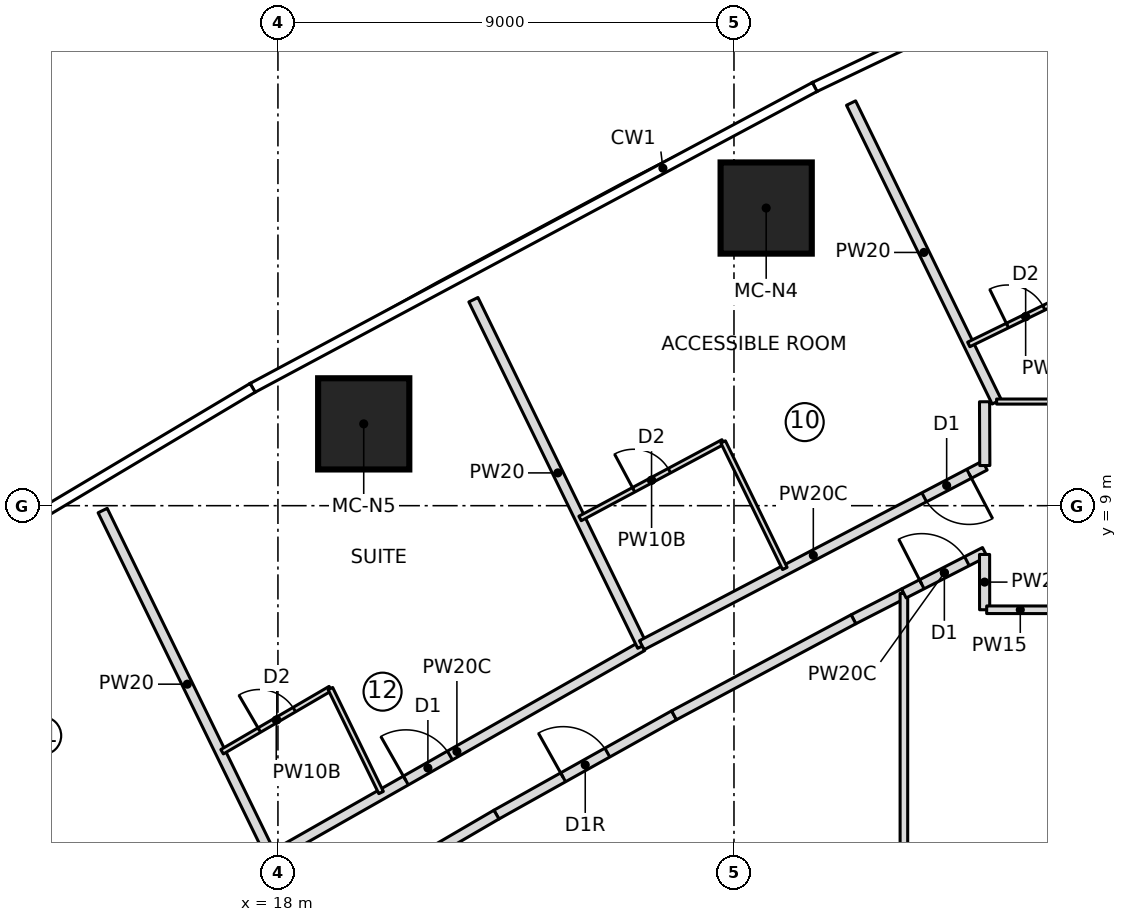
"""IFC4 building model, lengths in metres.
Left out: names, types, materials, properties, quantities, classifications, styles, units other than length and angle.
Written with IfcOpenShell. Run it as: python <this file> out.ifc"""

import sys

from ifc_helpers import new_model, si_unit, direction, frame, frame_2d, origin, origin_2d, place, context, subcontext, project, spatial, rectangle, extrude, element, fill, save


model = new_model("IFC4")
c1 = context("Model", 3, precision=1e-05, world=origin(), true_north=direction((0.0, 1.0)))
c2 = subcontext(c1, "Body", "Model", "MODEL_VIEW")
j1 = project(units=[si_unit("LENGTHUNIT", "METRE"), si_unit("PLANEANGLEUNIT", "RADIAN")], contexts=[c1])
p1 = place(None, origin())
s1 = spatial("IfcSite", under=j1, at=p1, CompositionType="ELEMENT")
p2 = place(p1, origin())
s2 = spatial("IfcBuilding", under=s1, at=p2, CompositionType="ELEMENT")
p3 = place(p2, frame((0.0, 0.0, 50.25)))
s3 = spatial("IfcBuildingStorey", under=s2, at=p3, CompositionType="ELEMENT", Elevation=50.25)
for number, where, z_axis, x_axis in (
    (1, (27.635, 14.874, 0.0), (0.0, 0.0, 1.0), (1.0, 0.0, 0.0)),
    (2, (19.693, 10.615, 0.0), (0.0, 0.0, 1.0), (1.0, 0.0, 0.0)),
):
    element("IfcColumn", number, at=place(p3, frame(where, z_axis=z_axis, x_axis=x_axis)), inside=s3, PredefinedType="COLUMN", context=c2, shape_type="SweptSolid", body=[
        extrude(rectangle(XDim=1.8, YDim=1.8, at=origin_2d()), origin(), (0.0, 0.0, 1.0), 3.55),
    ])
p4 = place(p3, frame((17.882, 2.05, 0.0), z_axis=(0.0, 0.0, 1.0), x_axis=(-0.438213564788, 0.898870887078, 0.0)))
e3 = element("IfcWall", 3, at=p4, inside=s3, PredefinedType="PARTITIONING", context=c2, shape_type="SweptSolid", body=[
    extrude(rectangle(XDim=7.625, YDim=0.2, at=frame_2d((3.813, 0.0))), origin(), (0.0, 0.0, 1.0), 3.25),
])
p5 = place(p3, frame((17.874, 2.068, 0.0), z_axis=(0.0, 0.0, 1.0), x_axis=(0.869280098963, 0.494319845391, 0.0)))
e4 = element("IfcWall", 4, at=p5, inside=s3, PredefinedType="PARTITIONING", context=c2, shape_type="SweptSolid", body=[
    extrude(rectangle(XDim=8.417, YDim=0.2, at=frame_2d((4.208, 0.0))), origin(), (0.0, 0.0, 1.0), 3.25),
])
p6 = place(p5, frame((3.05, 0.0, 0.0)))
e5 = element("IfcOpeningElement", 5, at=p6, cuts=e4, PredefinedType="OPENING", context=c2, shape_type="SweptSolid", body=[
    extrude(rectangle(XDim=1.0, YDim=2.1, at=frame_2d((0.5, 1.05))), frame((0.0, 0.11, 0.0), z_axis=(0.0, -1.0, 0.0), x_axis=(1.0, 0.0, 0.0)), (0.0, 0.0, 1.0), 0.22),
])
p7 = place(p3, frame((16.898, 4.144, 0.0), z_axis=(0.0, 0.0, 1.0), x_axis=(0.863707305865, 0.503993739837, 0.0)))
e6 = element("IfcWall", 6, at=p7, inside=s3, PredefinedType="PARTITIONING", context=c2, shape_type="SweptSolid", body=[
    extrude(rectangle(XDim=2.474, YDim=0.1, at=frame_2d((1.237, 0.0))), origin(), (0.0, 0.0, 1.0), 3.25),
])
p8 = place(p7, frame((0.85, 0.0, 0.0)))
e7 = element("IfcOpeningElement", 7, at=p8, cuts=e6, PredefinedType="OPENING", context=c2, shape_type="SweptSolid", body=[
    extrude(rectangle(XDim=0.8, YDim=2.1, at=frame_2d((0.4, 1.05))), frame((0.0, 0.06, 0.0), z_axis=(0.0, -1.0, 0.0), x_axis=(1.0, 0.0, 0.0)), (0.0, 0.0, 1.0), 0.12),
])
p9 = place(p3, frame((19.035, 5.39, 0.0), z_axis=(0.0, 0.0, 1.0), x_axis=(0.438122322582, -0.898915363344, 0.0)))
e8 = element("IfcWall", 8, at=p9, inside=s3, PredefinedType="PARTITIONING", context=c2, shape_type="SweptSolid", body=[
    extrude(rectangle(XDim=2.283, YDim=0.1, at=frame_2d((1.142, 0.0))), origin(), (0.0, 0.0, 1.0), 3.25),
])
p10 = place(p3, frame((25.19, 6.229, 0.0), z_axis=(0.0, 0.0, 1.0), x_axis=(-0.438202895602, 0.898876088394, 0.0)))
e9 = element("IfcWall", 9, at=p10, inside=s3, PredefinedType="PARTITIONING", context=c2, shape_type="SweptSolid", body=[
    extrude(rectangle(XDim=7.605, YDim=0.2, at=frame_2d((3.803, 0.0))), origin(), (0.0, 0.0, 1.0), 3.25),
])
p11 = place(p3, frame((31.95, 9.792, 0.0), z_axis=(0.0, 0.0, 1.0), x_axis=(-0.88581965272, -0.464029678851, 0.0)))
e10 = element("IfcWall", 10, at=p11, inside=s3, PredefinedType="PARTITIONING", context=c2, shape_type="SweptSolid", body=[
    extrude(rectangle(XDim=7.641, YDim=0.2, at=frame_2d((3.821, 0.0))), origin(), (0.0, 0.0, 1.0), 3.25),
])
p12 = place(p11, frame((0.35, 0.0, 0.0)))
e11 = element("IfcOpeningElement", 11, at=p12, cuts=e10, PredefinedType="OPENING", context=c2, shape_type="SweptSolid", body=[
    extrude(rectangle(XDim=1.0, YDim=2.1, at=frame_2d((0.5, 1.05))), frame((0.0, 0.11, 0.0), z_axis=(0.0, -1.0, 0.0), x_axis=(1.0, 0.0, 0.0)), (0.0, 0.0, 1.0), 0.22),
])
p13 = place(p3, frame((23.962, 8.748, 0.0), z_axis=(0.0, 0.0, 1.0), x_axis=(0.881653338438, 0.471897648672, 0.0)))
e12 = element("IfcWall", 12, at=p13, inside=s3, PredefinedType="PARTITIONING", context=c2, shape_type="SweptSolid", body=[
    extrude(rectangle(XDim=3.202, YDim=0.1, at=frame_2d((1.601, 0.0))), origin(), (0.0, 0.0, 1.0), 3.25),
])
p14 = place(p13, frame((1.2, 0.0, 0.0)))
e13 = element("IfcOpeningElement", 13, at=p14, cuts=e12, PredefinedType="OPENING", context=c2, shape_type="SweptSolid", body=[
    extrude(rectangle(XDim=0.8, YDim=2.1, at=frame_2d((0.4, 1.05))), frame((0.0, 0.06, 0.0), z_axis=(0.0, -1.0, 0.0), x_axis=(1.0, 0.0, 0.0)), (0.0, 0.0, 1.0), 0.12),
])
p15 = place(p3, frame((26.786, 10.259, 0.0), z_axis=(0.0, 0.0, 1.0), x_axis=(0.43822975423, -0.898862994292, 0.0)))
e14 = element("IfcWall", 14, at=p15, inside=s3, PredefinedType="PARTITIONING", context=c2, shape_type="SweptSolid", body=[
    extrude(rectangle(XDim=2.779, YDim=0.1, at=frame_2d((1.389, 0.0))), origin(), (0.0, 0.0, 1.0), 3.25),
])
p16 = place(p3, frame((32.185, 11.05, 0.0), z_axis=(0.0, 0.0, 1.0), x_axis=(-0.438228560869, 0.898863576099, 0.0)))
e15 = element("IfcWall", 15, at=p16, inside=s3, PredefinedType="PARTITIONING", context=c2, shape_type="SweptSolid", body=[
    extrude(rectangle(XDim=6.559, YDim=0.2, at=frame_2d((3.28, 0.0))), origin(), (0.0, 0.0, 1.0), 3.25),
])
p17 = place(p3, frame((31.633, 12.182, 0.0), z_axis=(0.0, 0.0, 1.0), x_axis=(0.89845285455, 0.439070003702, 0.0)))
e16 = element("IfcWall", 16, at=p17, inside=s3, PredefinedType="PARTITIONING", context=c2, shape_type="SweptSolid", body=[
    extrude(rectangle(XDim=2.5, YDim=0.1, at=frame_2d((1.25, 0.0))), origin(), (0.0, 0.0, 1.0), 3.25),
])
p18 = place(p17, frame((0.85, 0.0, 0.0)))
e17 = element("IfcOpeningElement", 17, at=p18, cuts=e16, PredefinedType="OPENING", context=c2, shape_type="SweptSolid", body=[
    extrude(rectangle(XDim=0.8, YDim=2.1, at=frame_2d((0.4, 1.05))), frame((0.0, 0.06, 0.0), z_axis=(0.0, -1.0, 0.0), x_axis=(1.0, 0.0, 0.0)), (0.0, 0.0, 1.0), 0.12),
])
p19 = place(p3, frame((22.312, 2.903, 0.0), z_axis=(0.0, 0.0, 1.0), x_axis=(0.872800289292, 0.488077509225, 0.0)))
e18 = element("IfcWall", 18, at=p19, inside=s3, PredefinedType="PARTITIONING", context=c2, shape_type="SweptSolid", body=[
    extrude(rectangle(XDim=4.016, YDim=0.2, at=frame_2d((2.008, 0.0))), origin(), (0.0, 0.0, 1.0), 3.25),
])
p20 = place(p19, frame((1.508, 0.0, 0.0)))
e19 = element("IfcOpeningElement", 19, at=p20, cuts=e18, PredefinedType="OPENING", context=c2, shape_type="SweptSolid", body=[
    extrude(rectangle(XDim=1.0, YDim=2.1, at=frame_2d((0.5, 1.05))), frame((0.0, 0.11, 0.0), z_axis=(0.0, -1.0, 0.0), x_axis=(1.0, 0.0, 0.0)), (0.0, 0.0, 1.0), 0.22),
])
p21 = place(p3, frame((29.357, 6.758, 0.0), z_axis=(0.0, 0.0, 1.0), x_axis=(0.890241988655, 0.455487872106, 0.0)))
e20 = element("IfcWall", 20, at=p21, inside=s3, PredefinedType="PARTITIONING", context=c2, shape_type="SweptSolid", body=[
    extrude(rectangle(XDim=1.119, YDim=0.2, at=frame_2d((0.559, 0.0))), origin(), (0.0, 0.0, 1.0), 3.25),
])
for number, where, z_axis, x_axis in (
    (21, (18.844, 0.879, 0.0), (0.0, 0.0, 1.0), (0.864, 0.504, 0.0)),
    (22, (25.817, 4.863, 0.0), (0.0, 0.0, 1.0), (0.882, 0.472, 0.0)),
):
    element("IfcWall", number, at=place(p3, frame(where, z_axis=z_axis, x_axis=x_axis)), inside=s3, PredefinedType="PARTITIONING", context=c2, shape_type="SweptSolid", body=[
        extrude(rectangle(XDim=4.016, YDim=0.2, at=frame_2d((2.008, 0.0))), origin(), (0.0, 0.0, 1.0), 3.25),
    ])
p22 = place(p3, frame((30.353, -7.268, 0.0), z_axis=(0.0, 0.0, 1.0), x_axis=(0.0, 1.0, 0.0)))
e23 = element("IfcWall", 23, at=p22, inside=s3, PredefinedType="PARTITIONING", context=c2, shape_type="SweptSolid", body=[
    extrude(rectangle(XDim=14.535, YDim=0.15, at=frame_2d((7.268, 0.0))), origin(), (0.0, 0.0, 1.0), 3.25),
])
p23 = place(p3, frame((30.353, 7.268, 0.0), z_axis=(0.0, 0.0, 1.0), x_axis=(0.890195531144, 0.455578660969, 0.0)))
e24 = element("IfcWall", 24, at=p23, inside=s3, PredefinedType="PARTITIONING", context=c2, shape_type="SweptSolid", body=[
    extrude(rectangle(XDim=1.794, YDim=0.2, at=frame_2d((0.897, 0.0))), origin(), (0.0, 0.0, 1.0), 3.25),
])
p24 = place(p23, frame((0.397, 0.0, 0.0)))
e25 = element("IfcOpeningElement", 25, at=p24, cuts=e24, PredefinedType="OPENING", context=c2, shape_type="SweptSolid", body=[
    extrude(rectangle(XDim=1.0, YDim=2.1, at=frame_2d((0.5, 1.05))), frame((0.0, 0.11, 0.0), z_axis=(0.0, -1.0, 0.0), x_axis=(1.0, 0.0, 0.0)), (0.0, 0.0, 1.0), 0.22),
])
p25 = place(p3, frame((34.553, 11.055, 0.0), z_axis=(0.0, 0.0, 1.0), x_axis=(-1.0, 0.0, 0.0)))
e26 = element("IfcWall", 26, at=p25, inside=s3, PredefinedType="PARTITIONING", context=c2, shape_type="SweptSolid", body=[
    extrude(rectangle(XDim=2.371, YDim=0.1, at=frame_2d((1.186, 0.0))), origin(), (0.0, 0.0, 1.0), 3.25),
])
p26 = place(p3, frame((31.945, 8.037, 0.0), z_axis=(0.0, 0.0, 1.0), x_axis=(0.001565993606, -0.999998773831, 0.0)))
e27 = element("IfcWall", 27, at=p26, inside=s3, PredefinedType="PARTITIONING", context=c2, shape_type="SweptSolid", body=[
    extrude(rectangle(XDim=1.091, YDim=0.2, at=frame_2d((0.546, 0.0))), origin(), (0.0, 0.0, 1.0), 3.25),
])
p27 = place(p3, frame((31.987, 6.946, 0.0), z_axis=(0.0, 0.0, 1.0), x_axis=(0.999999728974, -0.000736241288, 0.0)))
e28 = element("IfcWall", 28, at=p27, inside=s3, PredefinedType="PARTITIONING", context=c2, shape_type="SweptSolid", body=[
    extrude(rectangle(XDim=1.326, YDim=0.15, at=frame_2d((0.663, 0.0))), origin(), (0.0, 0.0, 1.0), 3.25),
])
p28 = place(p3, frame((31.945, 11.051, 0.0), z_axis=(0.0, 0.0, 1.0), x_axis=(0.00387969922, -0.999992473939, 0.0)))
e29 = element("IfcWall", 29, at=p28, inside=s3, PredefinedType="PARTITIONING", context=c2, shape_type="SweptSolid", body=[
    extrude(rectangle(XDim=1.259, YDim=0.2, at=frame_2d((0.629, 0.0))), origin(), (0.0, 0.0, 1.0), 3.25),
])
p29 = place(p8, origin())
e30 = element("IfcDoor", 30, at=p29, inside=s3, OperationType="SINGLE_SWING_LEFT", PredefinedType="DOOR", context=c2, shape_type="SweptSolid", body=[
    extrude(rectangle(XDim=0.8, YDim=2.1, at=frame_2d((0.4, 1.05))), frame((0.0, 0.025, 0.0), z_axis=(0.0, -1.0, 0.0), x_axis=(1.0, 0.0, 0.0)), (0.0, 0.0, 1.0), 0.05),
])
fill(e7, e30)
p30 = place(p6, origin())
e31 = element("IfcDoor", 31, at=p30, inside=s3, OperationType="SINGLE_SWING_LEFT", PredefinedType="DOOR", context=c2, shape_type="SweptSolid", body=[
    extrude(rectangle(XDim=1.0, YDim=2.1, at=frame_2d((0.5, 1.05))), frame((0.0, 0.025, 0.0), z_axis=(0.0, -1.0, 0.0), x_axis=(1.0, 0.0, 0.0)), (0.0, 0.0, 1.0), 0.05),
])
fill(e5, e31)
p31 = place(p14, origin())
e32 = element("IfcDoor", 32, at=p31, inside=s3, OperationType="SINGLE_SWING_LEFT", PredefinedType="DOOR", context=c2, shape_type="SweptSolid", body=[
    extrude(rectangle(XDim=0.8, YDim=2.1, at=frame_2d((0.4, 1.05))), frame((0.0, 0.025, 0.0), z_axis=(0.0, -1.0, 0.0), x_axis=(1.0, 0.0, 0.0)), (0.0, 0.0, 1.0), 0.05),
])
fill(e13, e32)
p32 = place(p12, origin())
e33 = element("IfcDoor", 33, at=p32, inside=s3, OperationType="SINGLE_SWING_LEFT", PredefinedType="DOOR", context=c2, shape_type="SweptSolid", body=[
    extrude(rectangle(XDim=1.0, YDim=2.1, at=frame_2d((0.5, 1.05))), frame((0.0, 0.025, 0.0), z_axis=(0.0, -1.0, 0.0), x_axis=(1.0, 0.0, 0.0)), (0.0, 0.0, 1.0), 0.05),
])
fill(e11, e33)
p33 = place(p18, origin())
e34 = element("IfcDoor", 34, at=p33, inside=s3, OperationType="SINGLE_SWING_LEFT", PredefinedType="DOOR", context=c2, shape_type="SweptSolid", body=[
    extrude(rectangle(XDim=0.8, YDim=2.1, at=frame_2d((0.4, 1.05))), frame((0.0, 0.025, 0.0), z_axis=(0.0, -1.0, 0.0), x_axis=(1.0, 0.0, 0.0)), (0.0, 0.0, 1.0), 0.05),
])
fill(e17, e34)
p34 = place(p20, origin())
e35 = element("IfcDoor", 35, at=p34, inside=s3, OperationType="SINGLE_SWING_RIGHT", PredefinedType="DOOR", context=c2, shape_type="SweptSolid", body=[
    extrude(rectangle(XDim=1.0, YDim=2.1, at=frame_2d((0.5, 1.05))), frame((0.0, 0.025, 0.0), z_axis=(0.0, -1.0, 0.0), x_axis=(1.0, 0.0, 0.0)), (0.0, 0.0, 1.0), 0.05),
])
fill(e19, e35)
p35 = place(p24, origin())
e36 = element("IfcDoor", 36, at=p35, inside=s3, OperationType="SINGLE_SWING_LEFT", PredefinedType="DOOR", context=c2, shape_type="SweptSolid", body=[
    extrude(rectangle(XDim=1.0, YDim=2.1, at=frame_2d((0.5, 1.05))), frame((0.0, 0.025, 0.0), z_axis=(0.0, -1.0, 0.0), x_axis=(1.0, 0.0, 0.0)), (0.0, 0.0, 1.0), 0.05),
])
fill(e25, e36)
save(model, sys.argv[1])
